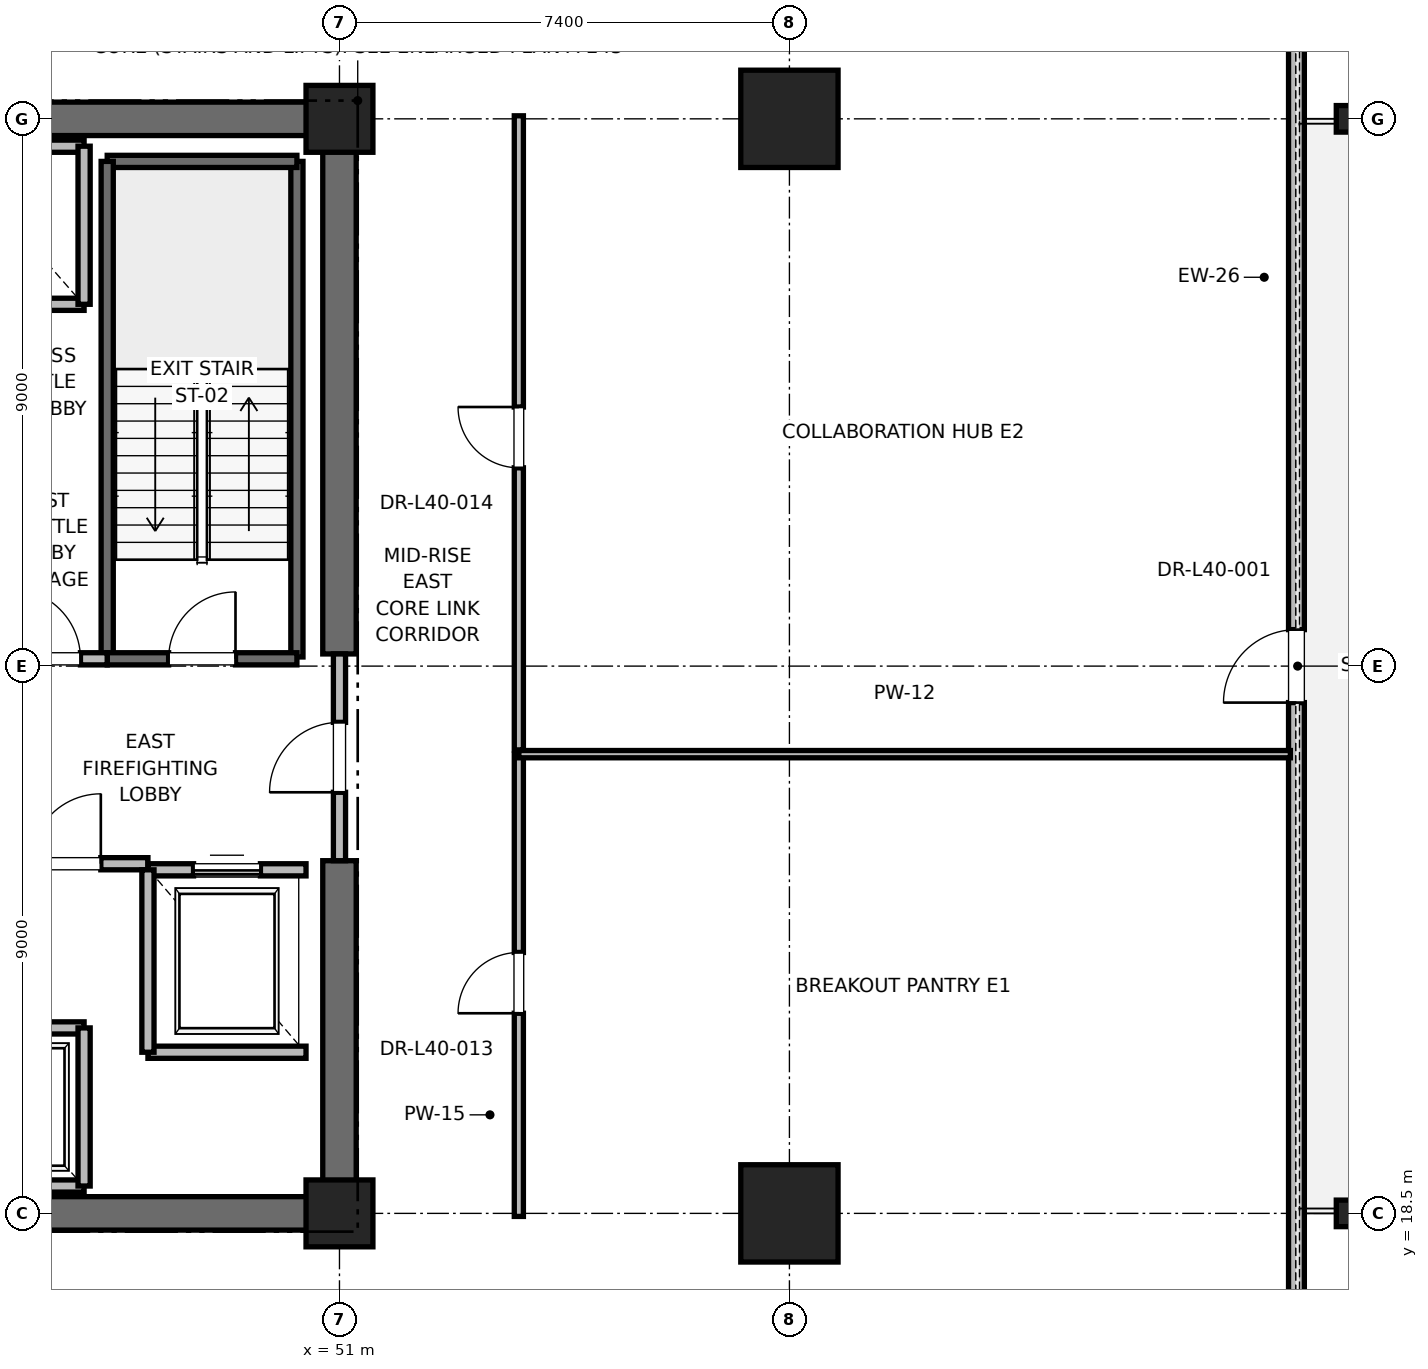
"""IFC4 building model, lengths in metres.
Left out: names, types, materials, properties, quantities, classifications, styles, units other than length and angle.
Written with IfcOpenShell. Run it as: python <this file> out.ifc"""

import sys

from ifc_helpers import new_model, si_unit, direction, frame, frame_2d, origin, origin_2d, place, context, subcontext, project, spatial, rectangle, i_section, extrude, element, fill, save


model = new_model("IFC4")
c1 = context("Model", 3, precision=1e-05, world=origin(), true_north=direction((0.0, 1.0)))
c2 = subcontext(c1, "Body", "Model", "MODEL_VIEW")
j1 = project(units=[si_unit("LENGTHUNIT", "METRE"), si_unit("PLANEANGLEUNIT", "RADIAN")], contexts=[c1])
p1 = place(None, origin())
s1 = spatial("IfcSite", under=j1, at=p1, CompositionType="ELEMENT")
p2 = place(p1, origin())
s2 = spatial("IfcBuilding", under=s1, at=p2, CompositionType="ELEMENT")
p3 = place(p2, frame((0.0, 0.0, 172.4)))
s3 = spatial("IfcBuildingStorey", under=s2, at=p3, CompositionType="ELEMENT", Elevation=172.4)
for number, where, z_axis, x_axis in (
    (1, (58.4, 18.5, 0.0), (0.0, 0.0, 1.0), (1.0, 0.0, 0.0)),
    (2, (58.4, 36.5, 0.0), (0.0, 0.0, 1.0), (1.0, 0.0, 0.0)),
):
    element("IfcColumn", number, at=place(p3, frame(where, z_axis=z_axis, x_axis=x_axis)), inside=s3, PredefinedType="COLUMN", context=c2, shape_type="SweptSolid", body=[
        extrude(rectangle(XDim=1.6, YDim=1.6, at=origin_2d()), origin(), (0.0, 0.0, 1.0), 4.0),
    ])
for number, where, z_axis, x_axis in (
    (3, (67.6, 18.5, 0.0), (0.0, 0.0, 1.0), (1.0, 0.0, 0.0)),
    (4, (67.6, 36.5, 0.0), (0.0, 0.0, 1.0), (1.0, 0.0, 0.0)),
):
    element("IfcColumn", number, at=place(p3, frame(where, z_axis=z_axis, x_axis=x_axis)), inside=s3, PredefinedType="COLUMN", context=c2, shape_type="SweptSolid", body=[
        extrude(i_section(OverallWidth=0.412, OverallDepth=0.437, WebThickness=0.036, FlangeThickness=0.058, FilletRadius=0.015, at=origin_2d()), origin(), (0.0, 0.0, 1.0), 4.0),
    ])
for number, where, z_axis, x_axis in (
    (5, (51.0, 18.5, 0.0), (0.0, 0.0, 1.0), (1.0, 0.0, 0.0)),
    (6, (51.0, 36.5, 0.0), (0.0, 0.0, 1.0), (1.0, 0.0, 0.0)),
):
    element("IfcColumn", number, at=place(p3, frame(where, z_axis=z_axis, x_axis=x_axis)), inside=s3, PredefinedType="PILASTER", context=c2, shape_type="SweptSolid", body=[
        extrude(rectangle(XDim=1.1, YDim=1.1, at=origin_2d()), origin(), (0.0, 0.0, 1.0), 4.0),
    ])
p4 = place(p3, frame((41.8, 18.5, 0.0), z_axis=(0.0, 0.0, 1.0), x_axis=(1.0, 0.0, 0.0)))
e7 = element("IfcWall", 7, at=p4, inside=s3, PredefinedType="SHEAR", context=c2, shape_type="SweptSolid", body=[
    extrude(rectangle(XDim=9.2, YDim=0.55, at=frame_2d((4.6, 0.0))), origin(), (0.0, 0.0, 1.0), 3.775),
])
for number, where, z_axis, x_axis in (
    (8, (45.2, 36.5, 0.0), (0.0, 0.0, 1.0), (1.0, 0.0, 0.0)),
    (9, (51.0, 18.5, 0.0), (0.0, 0.0, 1.0), (0.0, 1.0, 0.0)),
):
    element("IfcWall", number, at=place(p3, frame(where, z_axis=z_axis, x_axis=x_axis)), inside=s3, PredefinedType="SHEAR", context=c2, shape_type="SweptSolid", body=[
        extrude(rectangle(XDim=5.8, YDim=0.55, at=frame_2d((2.9, 0.0))), origin(), (0.0, 0.0, 1.0), 3.775),
    ])
p5 = place(p3, frame((51.0, 27.7, 0.0), z_axis=(0.0, 0.0, 1.0), x_axis=(0.0, 1.0, 0.0)))
e10 = element("IfcWall", 10, at=p5, inside=s3, PredefinedType="SHEAR", context=c2, shape_type="SweptSolid", body=[
    extrude(rectangle(XDim=8.8, YDim=0.55, at=frame_2d((4.4, 0.0))), origin(), (0.0, 0.0, 1.0), 3.775),
])
p6 = place(p3, frame((66.739, 9.111, 0.0), z_axis=(0.0, 0.0, 1.0), x_axis=(0.0, 1.0, 0.0)))
e11 = element("IfcWall", 11, at=p6, inside=s3, PredefinedType="PARAPET", context=c2, shape_type="SweptSolid", body=[
    extrude(rectangle(XDim=36.779, YDim=0.26, at=frame_2d((18.389, 0.0))), origin(), (0.0, 0.0, 1.0), 2.97),
])
p7 = place(p6, frame((4.2, 0.0, 0.85)))
e12 = element("IfcOpeningElement", 12, at=p7, cuts=e11, PredefinedType="OPENING", context=c2, shape_type="SweptSolid", body=[
    extrude(rectangle(XDim=2.0, YDim=2.3, at=frame_2d((1.0, 1.15))), frame((0.0, 0.13, 0.0), z_axis=(0.0, -1.0, 0.0), x_axis=(1.0, 0.0, 0.0)), (0.0, 0.0, 1.0), 0.26),
])
p8 = place(p6, frame((17.789, 0.0, 0.0)))
e13 = element("IfcOpeningElement", 13, at=p8, cuts=e11, PredefinedType="OPENING", context=c2, shape_type="SweptSolid", body=[
    extrude(rectangle(XDim=1.2, YDim=2.2, at=frame_2d((0.6, 1.1))), frame((0.0, 0.13, 0.0), z_axis=(0.0, -1.0, 0.0), x_axis=(1.0, 0.0, 0.0)), (0.0, 0.0, 1.0), 0.26),
])
p9 = place(p6, frame((30.579, 0.0, 0.85)))
e14 = element("IfcOpeningElement", 14, at=p9, cuts=e11, PredefinedType="OPENING", context=c2, shape_type="SweptSolid", body=[
    extrude(rectangle(XDim=2.0, YDim=2.3, at=frame_2d((1.0, 1.15))), frame((0.0, 0.13, 0.0), z_axis=(0.0, -1.0, 0.0), x_axis=(1.0, 0.0, 0.0)), (0.0, 0.0, 1.0), 0.26),
])
p10 = place(p3, frame((50.3, 27.65, 0.0), z_axis=(0.0, 0.0, 1.0), x_axis=(0.0, 1.0, 0.0)))
e15 = element("IfcWall", 15, at=p10, inside=s3, PredefinedType="SOLIDWALL", context=c2, shape_type="SweptSolid", body=[
    extrude(rectangle(XDim=8.15, YDim=0.2, at=frame_2d((4.075, 0.0))), origin(), (0.0, 0.0, 1.0), 3.775),
])
p11 = place(p3, frame((47.18, 35.8, 0.0), z_axis=(0.0, 0.0, 1.0), x_axis=(1.0, 0.0, 0.0)))
e16 = element("IfcWall", 16, at=p11, inside=s3, PredefinedType="SOLIDWALL", context=c2, shape_type="SweptSolid", body=[
    extrude(rectangle(XDim=3.12, YDim=0.2, at=frame_2d((1.56, 0.0))), origin(), (0.0, 0.0, 1.0), 3.775),
])
p12 = place(p3, frame((47.18, 27.62, 0.0), z_axis=(0.0, 0.0, 1.0), x_axis=(0.0, 1.0, 0.0)))
e17 = element("IfcWall", 17, at=p12, inside=s3, PredefinedType="SOLIDWALL", context=c2, shape_type="SweptSolid", body=[
    extrude(rectangle(XDim=8.18, YDim=0.2, at=frame_2d((4.09, 0.0))), origin(), (0.0, 0.0, 1.0), 3.775),
])
p13 = place(p3, frame((47.18, 27.62, 0.0), z_axis=(0.0, 0.0, 1.0), x_axis=(1.0, 0.0, 0.0)))
e18 = element("IfcWall", 18, at=p13, inside=s3, PredefinedType="SOLIDWALL", context=c2, shape_type="SweptSolid", body=[
    extrude(rectangle(XDim=3.12, YDim=0.2, at=frame_2d((1.56, 0.0))), origin(), (0.0, 0.0, 1.0), 3.775),
])
p14 = place(p13, frame((1.01, 0.0, 0.0)))
e19 = element("IfcOpeningElement", 19, at=p14, cuts=e18, PredefinedType="OPENING", context=c2, shape_type="SweptSolid", body=[
    extrude(rectangle(XDim=1.1, YDim=2.15, at=frame_2d((0.55, 1.075))), frame((0.0, 0.1, 0.0), z_axis=(0.0, -1.0, 0.0), x_axis=(1.0, 0.0, 0.0)), (0.0, 0.0, 1.0), 0.2),
])
p15 = place(p3, frame((45.15, 24.25, 0.0), z_axis=(0.0, 0.0, 1.0), x_axis=(1.0, 0.0, 0.0)))
e20 = element("IfcWall", 20, at=p15, inside=s3, PredefinedType="PARTITIONING", context=c2, shape_type="SweptSolid", body=[
    extrude(rectangle(XDim=2.7, YDim=0.2, at=frame_2d((1.35, 0.0))), origin(), (0.0, 0.0, 1.0), 3.775),
])
p16 = place(p15, frame((0.775, 0.0, 0.0)))
e21 = element("IfcOpeningElement", 21, at=p16, cuts=e20, PredefinedType="OPENING", context=c2, shape_type="SweptSolid", body=[
    extrude(rectangle(XDim=1.15, YDim=2.2, at=frame_2d((0.575, 1.1))), frame((0.0, 0.1, 0.0), z_axis=(0.0, -1.0, 0.0), x_axis=(1.0, 0.0, 0.0)), (0.0, 0.0, 1.0), 0.2),
])
p17 = place(p3, frame((45.15, 27.62, 0.0), z_axis=(0.0, 0.0, 1.0), x_axis=(1.0, 0.0, 0.0)))
e22 = element("IfcWall", 22, at=p17, inside=s3, PredefinedType="PARTITIONING", context=c2, shape_type="SweptSolid", body=[
    extrude(rectangle(XDim=2.03, YDim=0.2, at=frame_2d((1.015, 0.0))), origin(), (0.0, 0.0, 1.0), 3.775),
])
p18 = place(p17, frame((0.44, 0.0, 0.0)))
e23 = element("IfcOpeningElement", 23, at=p18, cuts=e22, PredefinedType="OPENING", context=c2, shape_type="SweptSolid", body=[
    extrude(rectangle(XDim=1.15, YDim=2.2, at=frame_2d((0.575, 1.1))), frame((0.0, 0.1, 0.0), z_axis=(0.0, -1.0, 0.0), x_axis=(1.0, 0.0, 0.0)), (0.0, 0.0, 1.0), 0.2),
])
p19 = place(p3, frame((51.0, 24.3, 0.0), z_axis=(0.0, 0.0, 1.0), x_axis=(0.0, 1.0, 0.0)))
e24 = element("IfcWall", 24, at=p19, inside=s3, PredefinedType="PARTITIONING", context=c2, shape_type="SweptSolid", body=[
    extrude(rectangle(XDim=3.4, YDim=0.2, at=frame_2d((1.7, 0.0))), origin(), (0.0, 0.0, 1.0), 2.755),
])
p20 = place(p19, frame((1.125, 0.0, 0.0)))
e25 = element("IfcOpeningElement", 25, at=p20, cuts=e24, PredefinedType="OPENING", context=c2, shape_type="SweptSolid", body=[
    extrude(rectangle(XDim=1.15, YDim=2.2, at=frame_2d((0.575, 1.1))), frame((0.0, 0.1, 0.0), z_axis=(0.0, -1.0, 0.0), x_axis=(1.0, 0.0, 0.0)), (0.0, 0.0, 1.0), 0.2),
])
p21 = place(p3, frame((47.85, 21.15, 0.0), z_axis=(0.0, 0.0, 1.0), x_axis=(1.0, 0.0, 0.0)))
e26 = element("IfcWall", 26, at=p21, inside=s3, PredefinedType="SOLIDWALL", context=c2, shape_type="SweptSolid", body=[
    extrude(rectangle(XDim=2.6, YDim=0.2, at=frame_2d((1.3, 0.0))), origin(), (0.0, 0.0, 1.0), 3.775),
])
p22 = place(p3, frame((50.45, 24.15, 0.0), z_axis=(0.0, 0.0, 1.0), x_axis=(-1.0, 0.0, 0.0)))
e27 = element("IfcWall", 27, at=p22, inside=s3, PredefinedType="SOLIDWALL", context=c2, shape_type="SweptSolid", body=[
    extrude(rectangle(XDim=2.6, YDim=0.2, at=frame_2d((1.3, 0.0))), origin(), (0.0, 0.0, 1.0), 2.755),
])
p23 = place(p22, frame((0.75, 0.0, 0.0)))
e28 = element("IfcOpeningElement", 28, at=p23, cuts=e27, PredefinedType="OPENING", context=c2, shape_type="SweptSolid", body=[
    extrude(rectangle(XDim=1.1, YDim=2.2, at=frame_2d((0.55, 1.1))), frame((0.0, 0.1, 0.0), z_axis=(0.0, -1.0, 0.0), x_axis=(1.0, 0.0, 0.0)), (0.0, 0.0, 1.0), 0.2),
])
p24 = place(p3, frame((47.85, 24.15, 0.0), z_axis=(0.0, 0.0, 1.0), x_axis=(0.0, -1.0, 0.0)))
e29 = element("IfcWall", 29, at=p24, inside=s3, PredefinedType="SOLIDWALL", context=c2, shape_type="SweptSolid", body=[
    extrude(rectangle(XDim=3.0, YDim=0.2, at=frame_2d((1.5, 0.0))), origin(), (0.0, 0.0, 1.0), 3.775),
])
p25 = place(p3, frame((44.5, 18.95, 0.0), z_axis=(0.0, 0.0, 1.0), x_axis=(1.0, 0.0, 0.0)))
e30 = element("IfcWall", 30, at=p25, inside=s3, PredefinedType="SOLIDWALL", context=c2, shape_type="SweptSolid", body=[
    extrude(rectangle(XDim=2.3, YDim=0.2, at=frame_2d((1.15, 0.0))), origin(), (0.0, 0.0, 1.0), 3.775),
])
p26 = place(p3, frame((46.8, 21.55, 0.0), z_axis=(0.0, 0.0, 1.0), x_axis=(-1.0, 0.0, 0.0)))
e31 = element("IfcWall", 31, at=p26, inside=s3, PredefinedType="SOLIDWALL", context=c2, shape_type="SweptSolid", body=[
    extrude(rectangle(XDim=2.3, YDim=0.2, at=frame_2d((1.15, 0.0))), origin(), (0.0, 0.0, 1.0), 3.775),
])
p27 = place(p26, frame((0.6, 0.0, 0.0)))
e32 = element("IfcOpeningElement", 32, at=p27, cuts=e31, PredefinedType="OPENING", context=c2, shape_type="SweptSolid", body=[
    extrude(rectangle(XDim=1.1, YDim=2.2, at=frame_2d((0.55, 1.1))), frame((0.0, 0.1, 0.0), z_axis=(0.0, -1.0, 0.0), x_axis=(1.0, 0.0, 0.0)), (0.0, 0.0, 1.0), 0.2),
])
p28 = place(p3, frame((46.8, 18.95, 0.0), z_axis=(0.0, 0.0, 1.0), x_axis=(0.0, 1.0, 0.0)))
e33 = element("IfcWall", 33, at=p28, inside=s3, PredefinedType="SOLIDWALL", context=c2, shape_type="SweptSolid", body=[
    extrude(rectangle(XDim=2.6, YDim=0.2, at=frame_2d((1.3, 0.0))), origin(), (0.0, 0.0, 1.0), 3.775),
])
p29 = place(p3, frame((44.5, 33.45, 0.0), z_axis=(0.0, 0.0, 1.0), x_axis=(1.0, 0.0, 0.0)))
e34 = element("IfcWall", 34, at=p29, inside=s3, PredefinedType="SOLIDWALL", context=c2, shape_type="SweptSolid", body=[
    extrude(rectangle(XDim=2.3, YDim=0.2, at=frame_2d((1.15, 0.0))), origin(), (0.0, 0.0, 1.0), 3.775),
])
p30 = place(p3, frame((46.8, 36.05, 0.0), z_axis=(0.0, 0.0, 1.0), x_axis=(-1.0, 0.0, 0.0)))
e35 = element("IfcWall", 35, at=p30, inside=s3, PredefinedType="SOLIDWALL", context=c2, shape_type="SweptSolid", body=[
    extrude(rectangle(XDim=2.3, YDim=0.2, at=frame_2d((1.15, 0.0))), origin(), (0.0, 0.0, 1.0), 2.755),
])
p31 = place(p3, frame((46.8, 33.45, 0.0), z_axis=(0.0, 0.0, 1.0), x_axis=(0.0, 1.0, 0.0)))
e36 = element("IfcWall", 36, at=p31, inside=s3, PredefinedType="SOLIDWALL", context=c2, shape_type="SweptSolid", body=[
    extrude(rectangle(XDim=2.6, YDim=0.2, at=frame_2d((1.3, 0.0))), origin(), (0.0, 0.0, 1.0), 3.775),
])
p32 = place(p3, frame((53.95, 18.45, 0.0), z_axis=(0.0, 0.0, 1.0), x_axis=(0.0, 1.0, 0.0)))
e37 = element("IfcWall", 37, at=p32, inside=s3, PredefinedType="PARTITIONING", context=c2, shape_type="SweptSolid", body=[
    extrude(rectangle(XDim=7.602, YDim=0.15, at=frame_2d((3.801, 0.0))), origin(), (0.0, 0.0, 1.0), 2.85),
])
p33 = place(p32, frame((3.341, 0.0, 0.0)))
e38 = element("IfcOpeningElement", 38, at=p33, cuts=e37, PredefinedType="OPENING", context=c2, shape_type="SweptSolid", body=[
    extrude(rectangle(XDim=1.0, YDim=2.15, at=frame_2d((0.5, 1.075))), frame((0.0, 0.075, 0.0), z_axis=(0.0, -1.0, 0.0), x_axis=(1.0, 0.0, 0.0)), (0.0, 0.0, 1.0), 0.15),
])
p34 = place(p3, frame((53.95, 26.052, 0.0), z_axis=(0.0, 0.0, 1.0), x_axis=(1.0, 0.0, 0.0)))
e39 = element("IfcWall", 39, at=p34, inside=s3, PredefinedType="PARTITIONING", context=c2, shape_type="SweptSolid", body=[
    extrude(rectangle(XDim=12.689, YDim=0.12, at=frame_2d((6.344, 0.0))), origin(), (0.0, 0.0, 1.0), 2.85),
])
p35 = place(p3, frame((53.95, 26.122, 0.0), z_axis=(0.0, 0.0, 1.0), x_axis=(0.0, 1.0, 0.0)))
e40 = element("IfcWall", 40, at=p35, inside=s3, PredefinedType="PARTITIONING", context=c2, shape_type="SweptSolid", body=[
    extrude(rectangle(XDim=10.428, YDim=0.15, at=frame_2d((5.214, 0.0))), origin(), (0.0, 0.0, 1.0), 2.85),
])
p36 = place(p35, frame((4.639, 0.0, 0.0)))
e41 = element("IfcOpeningElement", 41, at=p36, cuts=e40, PredefinedType="OPENING", context=c2, shape_type="SweptSolid", body=[
    extrude(rectangle(XDim=1.0, YDim=2.15, at=frame_2d((0.5, 1.075))), frame((0.0, 0.075, 0.0), z_axis=(0.0, -1.0, 0.0), x_axis=(1.0, 0.0, 0.0)), (0.0, 0.0, 1.0), 0.15),
])
p37 = place(p8, origin())
e42 = element("IfcDoor", 42, at=p37, inside=s3, OperationType="SINGLE_SWING_LEFT", PredefinedType="DOOR", context=c2, shape_type="SweptSolid", body=[
    extrude(rectangle(XDim=1.2, YDim=2.2, at=frame_2d((0.6, 1.1))), frame((0.0, 0.025, 0.0), z_axis=(0.0, -1.0, 0.0), x_axis=(1.0, 0.0, 0.0)), (0.0, 0.0, 1.0), 0.05),
])
fill(e13, e42)
p38 = place(p14, origin())
e43 = element("IfcDoor", 43, at=p38, inside=s3, OperationType="SINGLE_SWING_RIGHT", PredefinedType="DOOR", context=c2, shape_type="SweptSolid", body=[
    extrude(rectangle(XDim=1.1, YDim=2.15, at=frame_2d((0.55, 1.075))), frame((0.0, 0.025, 0.0), z_axis=(0.0, -1.0, 0.0), x_axis=(1.0, 0.0, 0.0)), (0.0, 0.0, 1.0), 0.05),
])
fill(e19, e43)
p39 = place(p16, origin())
e44 = element("IfcDoor", 44, at=p39, inside=s3, OperationType="SINGLE_SWING_RIGHT", PredefinedType="DOOR", context=c2, shape_type="SweptSolid", body=[
    extrude(rectangle(XDim=1.15, YDim=2.2, at=frame_2d((0.575, 1.1))), frame((0.0, 0.025, 0.0), z_axis=(0.0, -1.0, 0.0), x_axis=(1.0, 0.0, 0.0)), (0.0, 0.0, 1.0), 0.05),
])
fill(e21, e44)
p40 = place(p18, origin())
e45 = element("IfcDoor", 45, at=p40, inside=s3, OperationType="SINGLE_SWING_LEFT", PredefinedType="DOOR", context=c2, shape_type="SweptSolid", body=[
    extrude(rectangle(XDim=1.15, YDim=2.2, at=frame_2d((0.575, 1.1))), frame((0.0, 0.025, 0.0), z_axis=(0.0, -1.0, 0.0), x_axis=(1.0, 0.0, 0.0)), (0.0, 0.0, 1.0), 0.05),
])
fill(e23, e45)
p41 = place(p20, origin())
e46 = element("IfcDoor", 46, at=p41, inside=s3, OperationType="SINGLE_SWING_LEFT", PredefinedType="DOOR", context=c2, shape_type="SweptSolid", body=[
    extrude(rectangle(XDim=1.15, YDim=2.2, at=frame_2d((0.575, 1.1))), frame((0.0, 0.025, 0.0), z_axis=(0.0, -1.0, 0.0), x_axis=(1.0, 0.0, 0.0)), (0.0, 0.0, 1.0), 0.05),
])
fill(e25, e46)
p42 = place(p23, origin())
e47 = element("IfcDoor", 47, at=p42, inside=s3, OperationType="SLIDING_TO_RIGHT", PredefinedType="DOOR", context=c2, shape_type="SweptSolid", body=[
    extrude(rectangle(XDim=1.1, YDim=2.2, at=frame_2d((0.55, 1.1))), frame((0.0, 0.025, 0.0), z_axis=(0.0, -1.0, 0.0), x_axis=(1.0, 0.0, 0.0)), (0.0, 0.0, 1.0), 0.05),
])
fill(e28, e47)
p43 = place(p33, origin())
e48 = element("IfcDoor", 48, at=p43, inside=s3, OperationType="SINGLE_SWING_LEFT", PredefinedType="DOOR", context=c2, shape_type="SweptSolid", body=[
    extrude(rectangle(XDim=1.0, YDim=2.15, at=frame_2d((0.5, 1.075))), frame((0.0, 0.025, 0.0), z_axis=(0.0, -1.0, 0.0), x_axis=(1.0, 0.0, 0.0)), (0.0, 0.0, 1.0), 0.05),
])
fill(e38, e48)
p44 = place(p36, origin())
e49 = element("IfcDoor", 49, at=p44, inside=s3, OperationType="SINGLE_SWING_RIGHT", PredefinedType="DOOR", context=c2, shape_type="SweptSolid", body=[
    extrude(rectangle(XDim=1.0, YDim=2.15, at=frame_2d((0.5, 1.075))), frame((0.0, 0.025, 0.0), z_axis=(0.0, -1.0, 0.0), x_axis=(1.0, 0.0, 0.0)), (0.0, 0.0, 1.0), 0.05),
])
fill(e41, e49)
save(model, sys.argv[1])
